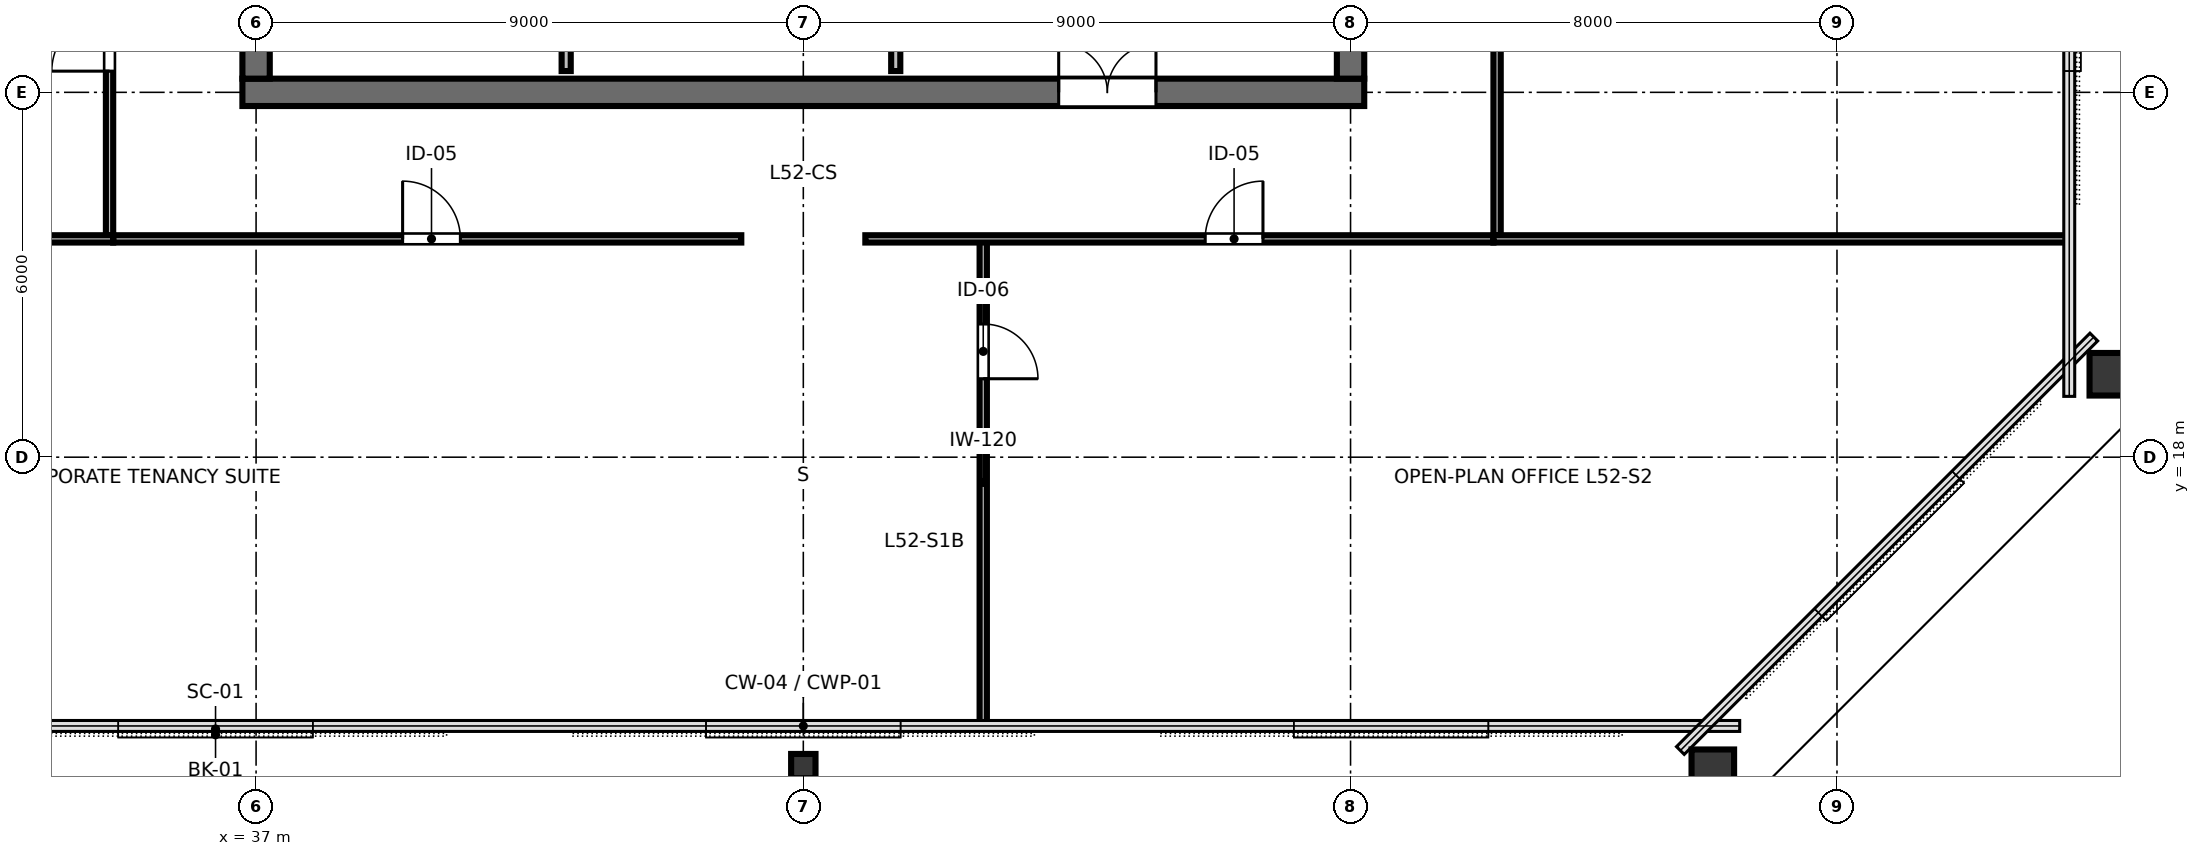
"""IFC4 building model, lengths in metres.
Left out: names, types, materials, properties, quantities, classifications, styles, units other than length and angle.
Written with IfcOpenShell. Run it as: python <this file> out.ifc"""

import sys

from ifc_helpers import new_model, si_unit, direction, frame, frame_2d, origin, origin_2d, place, context, subcontext, project, spatial, rectangle, hollow_rectangle, i_section, extrude, element, fill, save


model = new_model("IFC4")
c1 = context("Model", 3, precision=1e-05, world=origin(), true_north=direction((0.0, 1.0)))
c2 = subcontext(c1, "Body", "Model", "MODEL_VIEW")
j1 = project(units=[si_unit("LENGTHUNIT", "METRE"), si_unit("PLANEANGLEUNIT", "RADIAN")], contexts=[c1])
p1 = place(None, origin())
s1 = spatial("IfcSite", under=j1, at=p1, CompositionType="ELEMENT")
p2 = place(p1, origin())
s2 = spatial("IfcBuilding", under=s1, at=p2, CompositionType="ELEMENT")
p3 = place(p2, frame((0.0, 0.0, 198.6)))
s3 = spatial("IfcBuildingStorey", under=s2, at=p3, CompositionType="ELEMENT", Elevation=198.6)
p4 = place(p3, frame((36.775, 24.0, 0.0), z_axis=(0.0, 0.0, 1.0), x_axis=(1.0, 0.0, 0.0)))
e1 = element("IfcWall", 1, at=p4, inside=s3, PredefinedType="SHEAR", context=c2, shape_type="SweptSolid", body=[
    extrude(rectangle(XDim=18.45, YDim=0.45, at=frame_2d((9.225, 0.0))), origin(), (0.0, 0.0, 1.0), 3.36),
])
p5 = place(p4, frame((13.425, 0.0, 0.0)))
e2 = element("IfcOpeningElement", 2, at=p5, cuts=e1, PredefinedType="OPENING", context=c2, shape_type="SweptSolid", body=[
    extrude(rectangle(XDim=1.6, YDim=2.15, at=frame_2d((0.8, 1.075))), frame((0.0, 0.235, 0.0), z_axis=(0.0, -1.0, 0.0), x_axis=(1.0, 0.0, 0.0)), (0.0, 0.0, 1.0), 0.47),
])
p6 = place(p3, frame((37.0, 24.225, 0.0), z_axis=(0.0, 0.0, 1.0), x_axis=(0.0, 1.0, 0.0)))
e3 = element("IfcWall", 3, at=p6, inside=s3, PredefinedType="SHEAR", context=c2, shape_type="SweptSolid", body=[
    extrude(rectangle(XDim=15.55, YDim=0.45, at=frame_2d((7.775, 0.0))), origin(), (0.0, 0.0, 1.0), 3.36),
])
p7 = place(p6, frame((5.3, 0.0, 0.0)))
e4 = element("IfcOpeningElement", 4, at=p7, cuts=e3, PredefinedType="OPENING", context=c2, shape_type="SweptSolid", body=[
    extrude(rectangle(XDim=1.15, YDim=2.15, at=frame_2d((0.575, 1.075))), frame((0.0, 0.235, 0.0), z_axis=(0.0, -1.0, 0.0), x_axis=(1.0, 0.0, 0.0)), (0.0, 0.0, 1.0), 0.47),
])
p8 = place(p3, frame((55.0, 24.225, 0.0), z_axis=(0.0, 0.0, 1.0), x_axis=(0.0, 1.0, 0.0)))
e5 = element("IfcWall", 5, at=p8, inside=s3, PredefinedType="SHEAR", context=c2, shape_type="SweptSolid", body=[
    extrude(rectangle(XDim=15.55, YDim=0.45, at=frame_2d((7.775, 0.0))), origin(), (0.0, 0.0, 1.0), 3.36),
])
p9 = place(p8, frame((5.3, 0.0, 0.0)))
e6 = element("IfcOpeningElement", 6, at=p9, cuts=e5, PredefinedType="OPENING", context=c2, shape_type="SweptSolid", body=[
    extrude(rectangle(XDim=1.15, YDim=2.15, at=frame_2d((0.575, 1.075))), frame((0.0, 0.235, 0.0), z_axis=(0.0, -1.0, 0.0), x_axis=(1.0, 0.0, 0.0)), (0.0, 0.0, 1.0), 0.47),
])
p10 = place(p3, frame((46.0, 12.92, 0.0), z_axis=(0.0, 0.0, 1.0), x_axis=(1.0, 0.0, 0.0)))
e7 = element("IfcColumn", 7, at=p10, inside=s3, PredefinedType="COLUMN", context=c2, shape_type="SweptSolid", body=[
    extrude(i_section(OverallWidth=0.401, OverallDepth=0.399, WebThickness=0.025, FlangeThickness=0.04, FilletRadius=0.025, at=origin_2d()), origin(), (0.0, 0.0, 1.0), 3.373),
])
for number, where, z_axis, x_axis in (
    (8, (60.958, 12.768, 0.0), (0.0, 0.0, 1.0), (1.0, 0.0, 0.0)),
    (9, (67.579, 19.364, 0.0), (0.0, 0.0, 1.0), (0.0, 1.0, 0.0)),
):
    element("IfcColumn", number, at=place(p3, frame(where, z_axis=z_axis, x_axis=x_axis)), inside=s3, PredefinedType="COLUMN", context=c2, shape_type="SweptSolid", body=[
        extrude(hollow_rectangle(XDim=0.7, YDim=0.85, WallThickness=0.04, at=origin_2d()), origin(), (0.0, 0.0, 1.0), 3.373),
    ])
p11 = place(p3, frame((42.1, 24.35, 0.0), z_axis=(0.0, 0.0, 1.0), x_axis=(0.0, 1.0, 0.0)))
e10 = element("IfcWall", 10, at=p11, inside=s3, PredefinedType="PARTITIONING", context=c2, shape_type="SweptSolid", body=[
    extrude(rectangle(XDim=3.9, YDim=0.15, at=frame_2d((1.95, 0.0))), origin(), (0.0, 0.0, 1.0), 3.375),
])
p12 = place(p11, frame((1.5, 0.0, 0.0)))
e11 = element("IfcOpeningElement", 11, at=p12, cuts=e10, PredefinedType="OPENING", context=c2, shape_type="SweptSolid", body=[
    extrude(rectangle(XDim=0.9, YDim=2.15, at=frame_2d((0.45, 1.075))), frame((0.0, 0.085, 0.0), z_axis=(0.0, -1.0, 0.0), x_axis=(1.0, 0.0, 0.0)), (0.0, 0.0, 1.0), 0.17),
])
p13 = place(p3, frame((47.52, 24.35, 0.0), z_axis=(0.0, 0.0, 1.0), x_axis=(0.0, 1.0, 0.0)))
e12 = element("IfcWall", 12, at=p13, inside=s3, PredefinedType="PARTITIONING", context=c2, shape_type="SweptSolid", body=[
    extrude(rectangle(XDim=3.9, YDim=0.15, at=frame_2d((1.95, 0.0))), origin(), (0.0, 0.0, 1.0), 3.375),
])
p14 = place(p13, frame((0.35, 0.0, 0.0)))
e13 = element("IfcOpeningElement", 13, at=p14, cuts=e12, PredefinedType="OPENING", context=c2, shape_type="SweptSolid", body=[
    extrude(rectangle(XDim=0.9, YDim=2.15, at=frame_2d((0.45, 1.075))), frame((0.0, 0.085, 0.0), z_axis=(0.0, -1.0, 0.0), x_axis=(1.0, 0.0, 0.0)), (0.0, 0.0, 1.0), 0.17),
])
p15 = place(p3, frame((48.959, 21.59, 0.0), z_axis=(0.0, 0.0, 1.0), x_axis=(0.0, -1.0, 0.0)))
e14 = element("IfcWall", 14, at=p15, inside=s3, PredefinedType="PARTITIONING", context=c2, shape_type="SweptSolid", body=[
    extrude(rectangle(XDim=8.01, YDim=0.12, at=frame_2d((4.005, 0.0))), origin(), (0.0, 0.0, 1.0), 2.655),
])
p16 = place(p15, frame((1.4, 0.0, 0.0)))
e15 = element("IfcOpeningElement", 15, at=p16, cuts=e14, PredefinedType="OPENING", context=c2, shape_type="SweptSolid", body=[
    extrude(rectangle(XDim=0.9, YDim=2.15, at=frame_2d((0.45, 1.075))), frame((0.0, 0.07, 0.0), z_axis=(0.0, -1.0, 0.0), x_axis=(1.0, 0.0, 0.0)), (0.0, 0.0, 1.0), 0.14),
])
p17 = place(p3, frame((34.65, 21.59, 0.0), z_axis=(0.0, 0.0, 1.0), x_axis=(1.0, 0.0, 0.0)))
e16 = element("IfcWall", 16, at=p17, inside=s3, PredefinedType="PARTITIONING", context=c2, shape_type="SweptSolid", body=[
    extrude(rectangle(XDim=10.33, YDim=0.12, at=frame_2d((5.165, 0.0))), origin(), (0.0, 0.0, 1.0), 2.655),
])
p18 = place(p17, frame((4.76, 0.0, 0.0)))
e17 = element("IfcOpeningElement", 17, at=p18, cuts=e16, PredefinedType="OPENING", context=c2, shape_type="SweptSolid", body=[
    extrude(rectangle(XDim=0.95, YDim=2.15, at=frame_2d((0.475, 1.075))), frame((0.0, 0.07, 0.0), z_axis=(0.0, -1.0, 0.0), x_axis=(1.0, 0.0, 0.0)), (0.0, 0.0, 1.0), 0.14),
])
p19 = place(p3, frame((47.02, 21.59, 0.0), z_axis=(0.0, 0.0, 1.0), x_axis=(1.0, 0.0, 0.0)))
e18 = element("IfcWall", 18, at=p19, inside=s3, PredefinedType="PARTITIONING", context=c2, shape_type="SweptSolid", body=[
    extrude(rectangle(XDim=10.33, YDim=0.12, at=frame_2d((5.165, 0.0))), origin(), (0.0, 0.0, 1.0), 2.655),
])
p20 = place(p19, frame((5.59, 0.0, 0.0)))
e19 = element("IfcOpeningElement", 19, at=p20, cuts=e18, PredefinedType="OPENING", context=c2, shape_type="SweptSolid", body=[
    extrude(rectangle(XDim=0.95, YDim=2.15, at=frame_2d((0.475, 1.075))), frame((0.0, 0.07, 0.0), z_axis=(0.0, -1.0, 0.0), x_axis=(1.0, 0.0, 0.0)), (0.0, 0.0, 1.0), 0.14),
])
p21 = place(p3, frame((34.59, 21.65, 0.0), z_axis=(0.0, 0.0, 1.0), x_axis=(0.0, 1.0, 0.0)))
e20 = element("IfcWall", 20, at=p21, inside=s3, PredefinedType="PARTITIONING", context=c2, shape_type="SweptSolid", body=[
    extrude(rectangle(XDim=20.7, YDim=0.12, at=frame_2d((10.35, 0.0))), origin(), (0.0, 0.0, 1.0), 2.655),
])
p22 = place(p21, frame((2.698, 0.0, 0.0)))
e21 = element("IfcOpeningElement", 21, at=p22, cuts=e20, PredefinedType="OPENING", context=c2, shape_type="SweptSolid", body=[
    extrude(rectangle(XDim=0.95, YDim=2.15, at=frame_2d((0.475, 1.075))), frame((0.0, 0.07, 0.0), z_axis=(0.0, -1.0, 0.0), x_axis=(1.0, 0.0, 0.0)), (0.0, 0.0, 1.0), 0.14),
])
p23 = place(p21, frame((8.556, 0.0, 0.0)))
e22 = element("IfcOpeningElement", 22, at=p23, cuts=e20, PredefinedType="OPENING", context=c2, shape_type="SweptSolid", body=[
    extrude(rectangle(XDim=0.95, YDim=2.15, at=frame_2d((0.475, 1.075))), frame((0.0, 0.07, 0.0), z_axis=(0.0, -1.0, 0.0), x_axis=(1.0, 0.0, 0.0)), (0.0, 0.0, 1.0), 0.14),
])
p24 = place(p21, frame((15.733, 0.0, 0.0)))
e23 = element("IfcOpeningElement", 23, at=p24, cuts=e20, PredefinedType="OPENING", context=c2, shape_type="SweptSolid", body=[
    extrude(rectangle(XDim=0.95, YDim=2.15, at=frame_2d((0.475, 1.075))), frame((0.0, 0.07, 0.0), z_axis=(0.0, -1.0, 0.0), x_axis=(1.0, 0.0, 0.0)), (0.0, 0.0, 1.0), 0.14),
])
p25 = place(p3, frame((57.41, 21.65, 0.0), z_axis=(0.0, 0.0, 1.0), x_axis=(0.0, 1.0, 0.0)))
e24 = element("IfcWall", 24, at=p25, inside=s3, PredefinedType="PARTITIONING", context=c2, shape_type="SweptSolid", body=[
    extrude(rectangle(XDim=20.7, YDim=0.12, at=frame_2d((10.35, 0.0))), origin(), (0.0, 0.0, 1.0), 2.655),
])
p26 = place(p25, frame((5.525, 0.0, 0.0)))
e25 = element("IfcOpeningElement", 25, at=p26, cuts=e24, PredefinedType="OPENING", context=c2, shape_type="SweptSolid", body=[
    extrude(rectangle(XDim=0.95, YDim=2.15, at=frame_2d((0.475, 1.075))), frame((0.0, 0.07, 0.0), z_axis=(0.0, -1.0, 0.0), x_axis=(1.0, 0.0, 0.0)), (0.0, 0.0, 1.0), 0.14),
])
p27 = place(p25, frame((15.675, 0.0, 0.0)))
e26 = element("IfcOpeningElement", 26, at=p27, cuts=e24, PredefinedType="OPENING", context=c2, shape_type="SweptSolid", body=[
    extrude(rectangle(XDim=0.95, YDim=2.15, at=frame_2d((0.475, 1.075))), frame((0.0, 0.07, 0.0), z_axis=(0.0, -1.0, 0.0), x_axis=(1.0, 0.0, 0.0)), (0.0, 0.0, 1.0), 0.14),
])
for number, where, z_axis, x_axis in (
    (27, (34.65, 21.59, 0.0), (0.0, 0.0, 1.0), (-1.0, 0.0, 0.0)),
    (28, (57.35, 21.59, 0.0), (0.0, 0.0, 1.0), (1.0, 0.0, 0.0)),
):
    element("IfcWall", number, at=place(p3, frame(where, z_axis=z_axis, x_axis=x_axis)), inside=s3, PredefinedType="PARTITIONING", context=c2, shape_type="SweptSolid", body=[
        extrude(rectangle(XDim=9.47, YDim=0.12, at=frame_2d((4.735, 0.0))), origin(), (0.0, 0.0, 1.0), 2.655),
    ])
p28 = place(p5, origin())
e29 = element("IfcDoor", 29, at=p28, inside=s3, OperationType="DOUBLE_DOOR_SINGLE_SWING", PredefinedType="DOOR", context=c2, shape_type="SweptSolid", body=[
    extrude(rectangle(XDim=1.6, YDim=2.15, at=frame_2d((0.8, 1.075))), frame((0.0, 0.025, 0.0), z_axis=(0.0, -1.0, 0.0), x_axis=(1.0, 0.0, 0.0)), (0.0, 0.0, 1.0), 0.05),
])
fill(e2, e29)
p29 = place(p16, origin())
e30 = element("IfcDoor", 30, at=p29, inside=s3, OperationType="SINGLE_SWING_RIGHT", PredefinedType="DOOR", context=c2, shape_type="SweptSolid", body=[
    extrude(rectangle(XDim=0.9, YDim=2.15, at=frame_2d((0.45, 1.075))), frame((0.0, 0.025, 0.0), z_axis=(0.0, -1.0, 0.0), x_axis=(1.0, 0.0, 0.0)), (0.0, 0.0, 1.0), 0.05),
])
fill(e15, e30)
p30 = place(p18, origin())
e31 = element("IfcDoor", 31, at=p30, inside=s3, OperationType="SINGLE_SWING_LEFT", PredefinedType="DOOR", context=c2, shape_type="SweptSolid", body=[
    extrude(rectangle(XDim=0.95, YDim=2.15, at=frame_2d((0.475, 1.075))), frame((0.0, 0.025, 0.0), z_axis=(0.0, -1.0, 0.0), x_axis=(1.0, 0.0, 0.0)), (0.0, 0.0, 1.0), 0.05),
])
fill(e17, e31)
p31 = place(p20, origin())
e32 = element("IfcDoor", 32, at=p31, inside=s3, OperationType="SINGLE_SWING_RIGHT", PredefinedType="DOOR", context=c2, shape_type="SweptSolid", body=[
    extrude(rectangle(XDim=0.95, YDim=2.15, at=frame_2d((0.475, 1.075))), frame((0.0, 0.025, 0.0), z_axis=(0.0, -1.0, 0.0), x_axis=(1.0, 0.0, 0.0)), (0.0, 0.0, 1.0), 0.05),
])
fill(e19, e32)
p32 = place(p22, origin())
e33 = element("IfcDoor", 33, at=p32, inside=s3, OperationType="SINGLE_SWING_LEFT", PredefinedType="DOOR", context=c2, shape_type="SweptSolid", body=[
    extrude(rectangle(XDim=0.95, YDim=2.15, at=frame_2d((0.475, 1.075))), frame((0.0, 0.025, 0.0), z_axis=(0.0, -1.0, 0.0), x_axis=(1.0, 0.0, 0.0)), (0.0, 0.0, 1.0), 0.05),
])
fill(e21, e33)
save(model, sys.argv[1])
